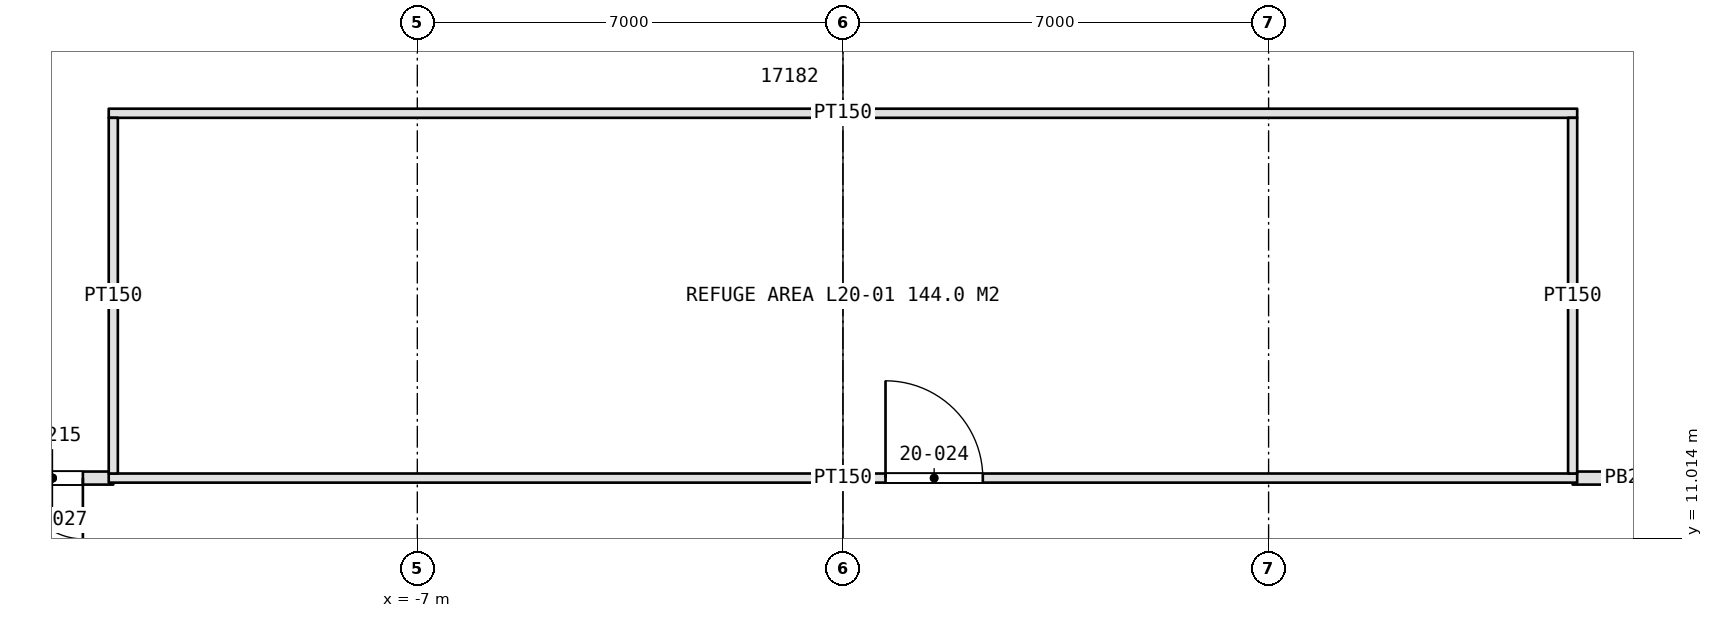
"""IFC4 building model, lengths in metres.
Left out: names, types, materials, properties, quantities, classifications, styles, units other than length and angle.
Written with IfcOpenShell. Run it as: python <this file> out.ifc"""

import sys

from ifc_helpers import new_model, si_unit, direction, frame, frame_2d, origin, place, context, subcontext, project, spatial, rectangle, extrude, element, fill, save


model = new_model("IFC4")
c1 = context("Model", 3, precision=1e-05, world=origin(), true_north=direction((0.0, 1.0)))
c2 = subcontext(c1, "Body", "Model", "MODEL_VIEW")
j1 = project(units=[si_unit("LENGTHUNIT", "METRE"), si_unit("PLANEANGLEUNIT", "RADIAN")], contexts=[c1])
p1 = place(None, origin())
s1 = spatial("IfcSite", under=j1, at=p1, CompositionType="ELEMENT")
p2 = place(p1, origin())
s2 = spatial("IfcBuilding", under=s1, at=p2, CompositionType="ELEMENT")
p3 = place(p2, frame((0.0, 0.0, 100.0)))
s3 = spatial("IfcBuildingStorey", under=s2, at=p3, CompositionType="ELEMENT", Elevation=100.0)
p4 = place(p3, frame((-12.0, 12.0, 0.0), z_axis=(0.0, 0.0, 1.0), x_axis=(-1.0, 0.0, 0.0)))
e1 = element("IfcWall", 1, at=p4, inside=s3, PredefinedType="PARTITIONING", context=c2, shape_type="SweptSolid", body=[
    extrude(rectangle(XDim=2.0, YDim=0.215, at=frame_2d((1.0, 0.0))), origin(), (0.0, 0.0, 1.0), 4.2),
])
p5 = place(p4, frame((0.5, 0.0, 0.0)))
e2 = element("IfcOpeningElement", 2, at=p5, cuts=e1, PredefinedType="OPENING", context=c2, shape_type="SweptSolid", body=[
    extrude(rectangle(XDim=1.0, YDim=2.2, at=frame_2d((0.5, 1.1))), frame((0.0, 0.118, 0.0), z_axis=(0.0, -1.0, 0.0), x_axis=(1.0, 0.0, 0.0)), (0.0, 0.0, 1.0), 0.235),
])
p6 = place(p3, frame((14.0, 12.0, 0.0), z_axis=(0.0, 0.0, 1.0), x_axis=(-1.0, 0.0, 0.0)))
e3 = element("IfcWall", 3, at=p6, inside=s3, PredefinedType="PARTITIONING", context=c2, shape_type="SweptSolid", body=[
    extrude(rectangle(XDim=2.0, YDim=0.215, at=frame_2d((1.0, 0.0))), origin(), (0.0, 0.0, 1.0), 4.2),
])
p7 = place(p3, frame((-12.075, 12.0, 0.0), z_axis=(0.0, 0.0, 1.0), x_axis=(1.0, 0.0, 0.0)))
e4 = element("IfcWall", 4, at=p7, inside=s3, PredefinedType="PARTITIONING", context=c2, shape_type="SweptSolid", body=[
    extrude(rectangle(XDim=24.15, YDim=0.15, at=frame_2d((12.075, 0.0))), origin(), (0.0, 0.0, 1.0), 4.2),
])
p8 = place(p7, frame((12.775, 0.0, 0.0)))
e5 = element("IfcOpeningElement", 5, at=p8, cuts=e4, PredefinedType="OPENING", context=c2, shape_type="SweptSolid", body=[
    extrude(rectangle(XDim=1.6, YDim=2.4, at=frame_2d((0.8, 1.2))), frame((0.0, 0.085, 0.0), z_axis=(0.0, -1.0, 0.0), x_axis=(1.0, 0.0, 0.0)), (0.0, 0.0, 1.0), 0.17),
])
p9 = place(p3, frame((-12.075, 18.0, 0.0), z_axis=(0.0, 0.0, 1.0), x_axis=(1.0, 0.0, 0.0)))
e6 = element("IfcWall", 6, at=p9, inside=s3, PredefinedType="PARTITIONING", context=c2, shape_type="SweptSolid", body=[
    extrude(rectangle(XDim=24.15, YDim=0.15, at=frame_2d((12.075, 0.0))), origin(), (0.0, 0.0, 1.0), 4.2),
])
for number, where, z_axis, x_axis in (
    (7, (-12.0, 12.075, 0.0), (0.0, 0.0, 1.0), (0.0, 1.0, 0.0)),
    (8, (12.0, 12.075, 0.0), (0.0, 0.0, 1.0), (0.0, 1.0, 0.0)),
):
    element("IfcWall", number, at=place(p3, frame(where, z_axis=z_axis, x_axis=x_axis)), inside=s3, PredefinedType="PARTITIONING", context=c2, shape_type="SweptSolid", body=[
        extrude(rectangle(XDim=5.85, YDim=0.15, at=frame_2d((2.925, 0.0))), origin(), (0.0, 0.0, 1.0), 4.2),
    ])
p10 = place(p8, origin())
e9 = element("IfcDoor", 9, at=p10, inside=s3, OperationType="DOUBLE_DOOR_SINGLE_SWING", PredefinedType="DOOR", context=c2, shape_type="SweptSolid", body=[
    extrude(rectangle(XDim=1.6, YDim=2.4, at=frame_2d((0.8, 1.2))), frame((0.0, 0.025, 0.0), z_axis=(0.0, -1.0, 0.0), x_axis=(1.0, 0.0, 0.0)), (0.0, 0.0, 1.0), 0.05),
])
fill(e5, e9)
p11 = place(p5, origin())
e10 = element("IfcDoor", 10, at=p11, inside=s3, OperationType="SINGLE_SWING_LEFT", PredefinedType="DOOR", context=c2, shape_type="SweptSolid", body=[
    extrude(rectangle(XDim=1.0, YDim=2.2, at=frame_2d((0.5, 1.1))), frame((0.0, 0.025, 0.0), z_axis=(0.0, -1.0, 0.0), x_axis=(1.0, 0.0, 0.0)), (0.0, 0.0, 1.0), 0.05),
])
fill(e2, e10)
save(model, sys.argv[1])
